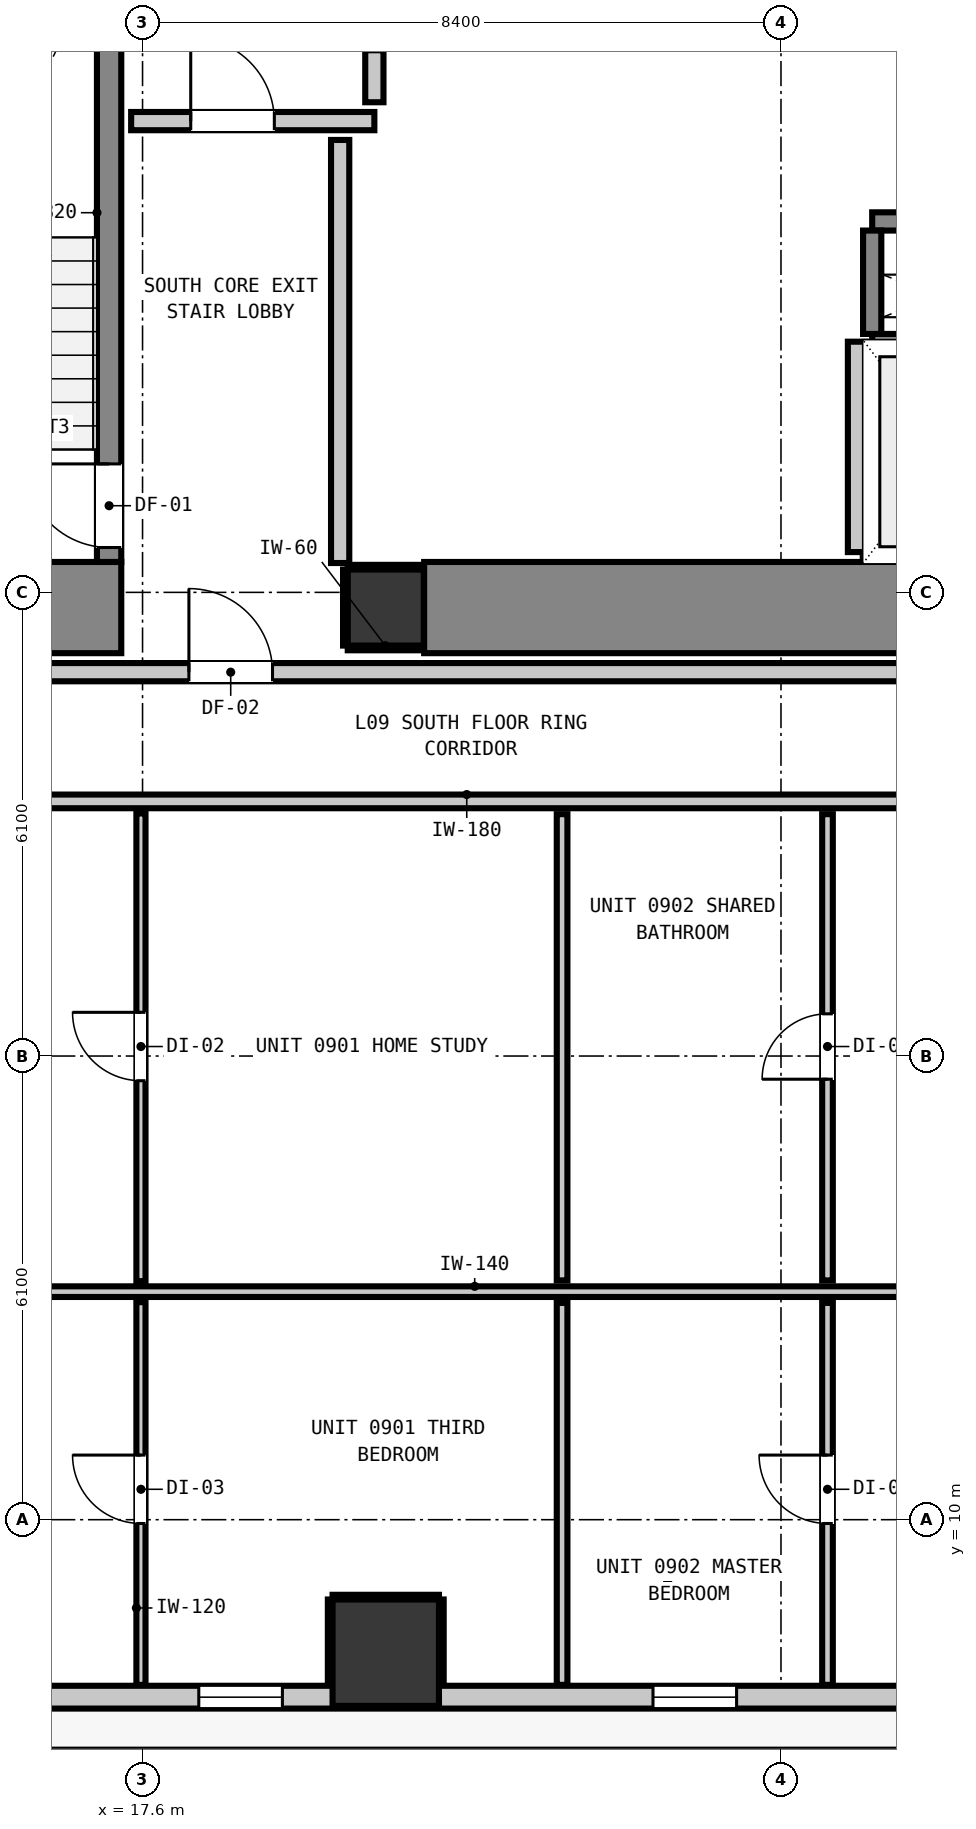
"""IFC4 building model, lengths in metres.
Left out: names, types, materials, properties, quantities, classifications, styles, units other than length and angle.
Written with IfcOpenShell. Run it as: python <this file> out.ifc"""

import sys

from ifc_helpers import new_model, si_unit, direction, frame, frame_2d, origin, origin_2d, place, context, subcontext, project, spatial, rectangle, extrude, element, fill, save


model = new_model("IFC4")
c1 = context("Model", 3, precision=1e-05, world=origin(), true_north=direction((0.0, 1.0)))
c2 = subcontext(c1, "Body", "Model", "MODEL_VIEW")
j1 = project(units=[si_unit("LENGTHUNIT", "METRE"), si_unit("PLANEANGLEUNIT", "RADIAN")], contexts=[c1])
p1 = place(None, origin())
s1 = spatial("IfcSite", under=j1, at=p1, CompositionType="ELEMENT")
p2 = place(p1, origin())
s2 = spatial("IfcBuilding", under=s1, at=p2, CompositionType="ELEMENT")
p3 = place(p2, frame((0.0, 0.0, 35.28)))
s3 = spatial("IfcBuildingStorey", under=s2, at=p3, CompositionType="ELEMENT", Elevation=35.28)
p4 = place(p3, frame((20.8, 22.0, 0.0), z_axis=(0.0, 0.0, 1.0), x_axis=(1.0, 0.0, 0.0)))
e1 = element("IfcColumn", 1, at=p4, inside=s3, PredefinedType="COLUMN", context=c2, shape_type="SweptSolid", body=[
    extrude(rectangle(XDim=1.0, YDim=1.0, at=origin_2d()), origin(), (0.0, 0.0, 1.0), 3.32),
])
p5 = place(p3, frame((13.24, 22.0, 0.0), z_axis=(0.0, 0.0, 1.0), x_axis=(1.0, 0.0, 0.0)))
e2 = element("IfcWall", 2, at=p5, inside=s3, PredefinedType="SHEAR", context=c2, shape_type="SweptSolid", body=[
    extrude(rectangle(XDim=4.08, YDim=1.2, at=frame_2d((2.04, 0.0))), origin(), (0.0, 0.0, 1.0), 3.32),
])
p6 = place(p3, frame((21.305, 22.0, 0.0), z_axis=(0.0, 0.0, 1.0), x_axis=(1.0, 0.0, 0.0)))
e3 = element("IfcWall", 3, at=p6, inside=s3, PredefinedType="SHEAR", context=c2, shape_type="SweptSolid", body=[
    extrude(rectangle(XDim=7.39, YDim=1.2, at=frame_2d((3.695, 0.0))), origin(), (0.0, 0.0, 1.0), 3.32),
])
p7 = place(p3, frame((17.16, 22.6, 0.0), z_axis=(0.0, 0.0, 1.0), x_axis=(0.0, 1.0, 0.0)))
e4 = element("IfcWall", 4, at=p7, inside=s3, PredefinedType="SHEAR", context=c2, shape_type="SweptSolid", body=[
    extrude(rectangle(XDim=7.8, YDim=0.32, at=frame_2d((3.9, 0.0))), origin(), (0.0, 0.0, 1.0), 3.32),
])
p8 = place(p7, frame((0.19, 0.0, 0.0)))
e5 = element("IfcOpeningElement", 5, at=p8, cuts=e4, PredefinedType="OPENING", context=c2, shape_type="SweptSolid", body=[
    extrude(rectangle(XDim=1.1, YDim=2.15, at=frame_2d((0.55, 1.075))), frame((0.0, 0.17, 0.0), z_axis=(0.0, -1.0, 0.0), x_axis=(1.0, 0.0, 0.0)), (0.0, 0.0, 1.0), 0.34),
])
for number, where, z_axis, x_axis in (
    (6, (27.2, 25.48, 0.0), (0.0, 0.0, 1.0), (1.0, 0.0, 0.0)),
    (7, (27.2, 27.08, 0.0), (0.0, 0.0, 1.0), (1.0, 0.0, 0.0)),
):
    element("IfcWall", number, at=place(p3, frame(where, z_axis=z_axis, x_axis=x_axis)), inside=s3, PredefinedType="SHEAR", context=c2, shape_type="SweptSolid", body=[
        extrude(rectangle(XDim=1.7, YDim=0.24, at=frame_2d((0.85, 0.0))), origin(), (0.0, 0.0, 1.0), 3.32),
    ])
p9 = place(p3, frame((27.2, 25.6, 0.0), z_axis=(0.0, 0.0, 1.0), x_axis=(0.0, 1.0, 0.0)))
e8 = element("IfcWall", 8, at=p9, inside=s3, PredefinedType="SHEAR", context=c2, shape_type="SweptSolid", body=[
    extrude(rectangle(XDim=1.36, YDim=0.24, at=frame_2d((0.68, 0.0))), origin(), (0.0, 0.0, 1.0), 3.32),
])
p10 = place(p3, frame((20.8, 8.25, 0.0), z_axis=(0.0, 0.0, 1.0), x_axis=(1.0, 0.0, 0.0)))
e9 = element("IfcColumn", 9, at=p10, inside=s3, PredefinedType="COLUMN", context=c2, shape_type="SweptSolid", body=[
    extrude(rectangle(XDim=1.4, YDim=1.4, at=origin_2d()), origin(), (0.0, 0.0, 1.0), 3.32),
])
p11 = place(p3, frame((41.635, 7.665, 0.0), z_axis=(0.0, 0.0, 1.0), x_axis=(-1.0, 0.0, 0.0)))
e10 = element("IfcWall", 10, at=p11, inside=s3, PredefinedType="STANDARD", context=c2, shape_type="SweptSolid", body=[
    extrude(rectangle(XDim=37.47, YDim=0.3, at=frame_2d((18.735, 0.0))), origin(), (0.0, 0.0, 1.0), 3.06),
])
p12 = place(p11, frame((0.901, 0.0, 0.0)))
e11 = element("IfcOpeningElement", 11, at=p12, cuts=e10, PredefinedType="OPENING", context=c2, shape_type="SweptSolid", body=[
    extrude(rectangle(XDim=1.0, YDim=2.15, at=frame_2d((0.5, 1.075))), frame((0.0, 0.16, 0.0), z_axis=(0.0, -1.0, 0.0), x_axis=(1.0, 0.0, 0.0)), (0.0, 0.0, 1.0), 0.32),
])
p13 = place(p11, frame((32.595, 0.0, 0.85)))
e12 = element("IfcOpeningElement", 12, at=p13, cuts=e10, PredefinedType="OPENING", context=c2, shape_type="SweptSolid", body=[
    extrude(rectangle(XDim=1.1, YDim=2.05, at=frame_2d((0.55, 1.025))), frame((0.0, 0.16, 0.0), z_axis=(0.0, -1.0, 0.0), x_axis=(1.0, 0.0, 0.0)), (0.0, 0.0, 1.0), 0.32),
])
p14 = place(p11, frame((36.621, 0.0, 0.85)))
e13 = element("IfcOpeningElement", 13, at=p14, cuts=e10, PredefinedType="OPENING", context=c2, shape_type="SweptSolid", body=[
    extrude(rectangle(XDim=0.58, YDim=1.5, at=frame_2d((0.29, 0.75))), frame((0.0, 0.16, 0.0), z_axis=(0.0, -1.0, 0.0), x_axis=(1.0, 0.0, 0.0)), (0.0, 0.0, 1.0), 0.32),
])
p15 = place(p11, frame((25.295, 0.0, 0.85)))
e14 = element("IfcOpeningElement", 14, at=p15, cuts=e10, PredefinedType="OPENING", context=c2, shape_type="SweptSolid", body=[
    extrude(rectangle(XDim=1.1, YDim=2.05, at=frame_2d((0.55, 1.025))), frame((0.0, 0.16, 0.0), z_axis=(0.0, -1.0, 0.0), x_axis=(1.0, 0.0, 0.0)), (0.0, 0.0, 1.0), 0.32),
])
p16 = place(p11, frame((22.195, 0.0, 0.85)))
e15 = element("IfcOpeningElement", 15, at=p16, cuts=e10, PredefinedType="OPENING", context=c2, shape_type="SweptSolid", body=[
    extrude(rectangle(XDim=1.1, YDim=2.05, at=frame_2d((0.55, 1.025))), frame((0.0, 0.16, 0.0), z_axis=(0.0, -1.0, 0.0), x_axis=(1.0, 0.0, 0.0)), (0.0, 0.0, 1.0), 0.32),
])
p17 = place(p11, frame((8.235, 0.0, 0.85)))
e16 = element("IfcOpeningElement", 16, at=p17, cuts=e10, PredefinedType="OPENING", context=c2, shape_type="SweptSolid", body=[
    extrude(rectangle(XDim=1.1, YDim=2.05, at=frame_2d((0.55, 1.025))), frame((0.0, 0.16, 0.0), z_axis=(0.0, -1.0, 0.0), x_axis=(1.0, 0.0, 0.0)), (0.0, 0.0, 1.0), 0.32),
])
p18 = place(p11, frame((16.219, 0.0, 0.85)))
e17 = element("IfcOpeningElement", 17, at=p18, cuts=e10, PredefinedType="OPENING", context=c2, shape_type="SweptSolid", body=[
    extrude(rectangle(XDim=1.1, YDim=2.05, at=frame_2d((0.55, 1.025))), frame((0.0, 0.16, 0.0), z_axis=(0.0, -1.0, 0.0), x_axis=(1.0, 0.0, 0.0)), (0.0, 0.0, 1.0), 0.32),
])
p19 = place(p3, frame((27.0, 22.73, 0.0), z_axis=(0.0, 0.0, 1.0), x_axis=(0.0, 1.0, 0.0)))
e18 = element("IfcWall", 18, at=p19, inside=s3, PredefinedType="PARTITIONING", context=c2, shape_type="SweptSolid", body=[
    extrude(rectangle(XDim=2.768, YDim=0.24, at=frame_2d((1.384, 0.0))), origin(), (0.0, 0.0, 1.0), 3.06),
])
p20 = place(p3, frame((1.827, 21.15, 0.0), z_axis=(0.0, 0.0, 1.0), x_axis=(1.0, 0.0, 0.0)))
e19 = element("IfcWall", 19, at=p20, inside=s3, PredefinedType="PARTITIONING", context=c2, shape_type="SweptSolid", body=[
    extrude(rectangle(XDim=42.146, YDim=0.24, at=frame_2d((21.073, 0.0))), origin(), (0.0, 0.0, 1.0), 3.06),
])
p21 = place(p20, frame((16.383, 0.0, 0.0)))
e20 = element("IfcOpeningElement", 20, at=p21, cuts=e19, PredefinedType="OPENING", context=c2, shape_type="SweptSolid", body=[
    extrude(rectangle(XDim=1.1, YDim=2.15, at=frame_2d((0.55, 1.075))), frame((0.0, 0.13, 0.0), z_axis=(0.0, -1.0, 0.0), x_axis=(1.0, 0.0, 0.0)), (0.0, 0.0, 1.0), 0.26),
])
p22 = place(p20, frame((8.647, 0.0, 0.0)))
e21 = element("IfcOpeningElement", 21, at=p22, cuts=e19, PredefinedType="OPENING", context=c2, shape_type="SweptSolid", body=[
    extrude(rectangle(XDim=1.4, YDim=2.15, at=frame_2d((0.7, 1.075))), frame((0.0, 0.13, 0.0), z_axis=(0.0, -1.0, 0.0), x_axis=(1.0, 0.0, 0.0)), (0.0, 0.0, 1.0), 0.26),
])
p23 = place(p20, frame((38.574, 0.0, 0.0)))
e22 = element("IfcOpeningElement", 22, at=p23, cuts=e19, PredefinedType="OPENING", context=c2, shape_type="SweptSolid", body=[
    extrude(rectangle(XDim=0.9, YDim=2.1, at=frame_2d((0.45, 1.05))), frame((0.0, 0.13, 0.0), z_axis=(0.0, -1.0, 0.0), x_axis=(1.0, 0.0, 0.0)), (0.0, 0.0, 1.0), 0.26),
])
p24 = place(p3, frame((17.45, 28.4, 0.0), z_axis=(0.0, 0.0, 1.0), x_axis=(1.0, 0.0, 0.0)))
e23 = element("IfcWall", 23, at=p24, inside=s3, PredefinedType="PARTITIONING", context=c2, shape_type="SweptSolid", body=[
    extrude(rectangle(XDim=3.2, YDim=0.24, at=frame_2d((1.6, 0.0))), origin(), (0.0, 0.0, 1.0), 3.06),
])
p25 = place(p24, frame((0.784, 0.0, 0.0)))
e24 = element("IfcOpeningElement", 24, at=p25, cuts=e23, PredefinedType="OPENING", context=c2, shape_type="SweptSolid", body=[
    extrude(rectangle(XDim=1.1, YDim=2.15, at=frame_2d((0.55, 1.075))), frame((0.0, 0.13, 0.0), z_axis=(0.0, -1.0, 0.0), x_axis=(1.0, 0.0, 0.0)), (0.0, 0.0, 1.0), 0.26),
])
p26 = place(p3, frame((1.827, 19.45, 0.0), z_axis=(0.0, 0.0, 1.0), x_axis=(1.0, 0.0, 0.0)))
e25 = element("IfcWall", 25, at=p26, inside=s3, PredefinedType="PARTITIONING", context=c2, shape_type="SweptSolid", body=[
    extrude(rectangle(XDim=42.146, YDim=0.18, at=frame_2d((21.073, 0.0))), origin(), (0.0, 0.0, 1.0), 3.06),
])
p27 = place(p26, frame((8.602, 0.0, 0.0)))
e26 = element("IfcOpeningElement", 26, at=p27, cuts=e25, PredefinedType="OPENING", context=c2, shape_type="SweptSolid", body=[
    extrude(rectangle(XDim=1.0, YDim=2.15, at=frame_2d((0.5, 1.075))), frame((0.0, 0.1, 0.0), z_axis=(0.0, -1.0, 0.0), x_axis=(1.0, 0.0, 0.0)), (0.0, 0.0, 1.0), 0.2),
])
p28 = place(p26, frame((30.475, 0.0, 0.0)))
e27 = element("IfcOpeningElement", 27, at=p28, cuts=e25, PredefinedType="OPENING", context=c2, shape_type="SweptSolid", body=[
    extrude(rectangle(XDim=1.0, YDim=2.15, at=frame_2d((0.5, 1.075))), frame((0.0, 0.1, 0.0), z_axis=(0.0, -1.0, 0.0), x_axis=(1.0, 0.0, 0.0)), (0.0, 0.0, 1.0), 0.2),
])
p29 = place(p3, frame((11.688, 13.0, 0.0), z_axis=(0.0, 0.0, 1.0), x_axis=(1.0, 0.0, 0.0)))
e28 = element("IfcWall", 28, at=p29, inside=s3, PredefinedType="PARTITIONING", context=c2, shape_type="SweptSolid", body=[
    extrude(rectangle(XDim=32.285, YDim=0.14, at=frame_2d((16.143, 0.0))), origin(), (0.0, 0.0, 1.0), 3.06),
])
p30 = place(p29, frame((20.664, 0.0, 0.0)))
e29 = element("IfcOpeningElement", 29, at=p30, cuts=e28, PredefinedType="OPENING", context=c2, shape_type="SweptSolid", body=[
    extrude(rectangle(XDim=0.9, YDim=2.1, at=frame_2d((0.45, 1.05))), frame((0.0, 0.08, 0.0), z_axis=(0.0, -1.0, 0.0), x_axis=(1.0, 0.0, 0.0)), (0.0, 0.0, 1.0), 0.16),
])
p31 = place(p3, frame((20.2, 22.586, 0.0), z_axis=(0.0, 0.0, 1.0), x_axis=(0.0, 1.0, 0.0)))
e30 = element("IfcWall", 30, at=p31, inside=s3, PredefinedType="PARTITIONING", context=c2, shape_type="SweptSolid", body=[
    extrude(rectangle(XDim=5.566, YDim=0.24, at=frame_2d((2.783, 0.0))), origin(), (0.0, 0.0, 1.0), 3.06),
])
p32 = place(p3, frame((20.65, 28.648, 0.0), z_axis=(0.0, 0.0, 1.0), x_axis=(0.0, 1.0, 0.0)))
e31 = element("IfcWall", 31, at=p32, inside=s3, PredefinedType="PARTITIONING", context=c2, shape_type="SweptSolid", body=[
    extrude(rectangle(XDim=0.684, YDim=0.24, at=frame_2d((0.342, 0.0))), origin(), (0.0, 0.0, 1.0), 2.295),
])
p33 = place(p3, frame((23.12, 7.827, 0.0), z_axis=(0.0, 0.0, 1.0), x_axis=(0.0, 1.0, 0.0)))
e32 = element("IfcWall", 32, at=p33, inside=s3, PredefinedType="PARTITIONING", context=c2, shape_type="SweptSolid", body=[
    extrude(rectangle(XDim=5.025, YDim=0.14, at=frame_2d((2.513, 0.0))), origin(), (0.0, 0.0, 1.0), 3.06),
])
p34 = place(p3, frame((23.12, 13.148, 0.0), z_axis=(0.0, 0.0, 1.0), x_axis=(0.0, 1.0, 0.0)))
e33 = element("IfcWall", 33, at=p34, inside=s3, PredefinedType="PARTITIONING", context=c2, shape_type="SweptSolid", body=[
    extrude(rectangle(XDim=6.134, YDim=0.14, at=frame_2d((3.067, 0.0))), origin(), (0.0, 0.0, 1.0), 3.06),
])
p35 = place(p3, frame((26.612, 7.827, 0.0), z_axis=(0.0, 0.0, 1.0), x_axis=(0.0, 1.0, 0.0)))
e34 = element("IfcWall", 34, at=p35, inside=s3, PredefinedType="PARTITIONING", context=c2, shape_type="SweptSolid", body=[
    extrude(rectangle(XDim=5.025, YDim=0.14, at=frame_2d((2.513, 0.0))), origin(), (0.0, 0.0, 1.0), 3.06),
])
p36 = place(p35, frame((2.123, 0.0, 0.0)))
e35 = element("IfcOpeningElement", 35, at=p36, cuts=e34, PredefinedType="OPENING", context=c2, shape_type="SweptSolid", body=[
    extrude(rectangle(XDim=0.9, YDim=2.1, at=frame_2d((0.45, 1.05))), frame((0.0, 0.08, 0.0), z_axis=(0.0, -1.0, 0.0), x_axis=(1.0, 0.0, 0.0)), (0.0, 0.0, 1.0), 0.16),
])
p37 = place(p3, frame((26.612, 13.148, 0.0), z_axis=(0.0, 0.0, 1.0), x_axis=(0.0, 1.0, 0.0)))
e36 = element("IfcWall", 36, at=p37, inside=s3, PredefinedType="PARTITIONING", context=c2, shape_type="SweptSolid", body=[
    extrude(rectangle(XDim=6.134, YDim=0.14, at=frame_2d((3.067, 0.0))), origin(), (0.0, 0.0, 1.0), 3.06),
])
p38 = place(p37, frame((2.647, 0.0, 0.0)))
e37 = element("IfcOpeningElement", 37, at=p38, cuts=e36, PredefinedType="OPENING", context=c2, shape_type="SweptSolid", body=[
    extrude(rectangle(XDim=0.86, YDim=2.02, at=frame_2d((0.43, 1.01))), frame((0.0, 0.08, 0.0), z_axis=(0.0, -1.0, 0.0), x_axis=(1.0, 0.0, 0.0)), (0.0, 0.0, 1.0), 0.16),
])
p39 = place(p3, frame((17.579, 7.827, 0.0), z_axis=(0.0, 0.0, 1.0), x_axis=(0.0, 1.0, 0.0)))
e38 = element("IfcWall", 38, at=p39, inside=s3, PredefinedType="PARTITIONING", context=c2, shape_type="SweptSolid", body=[
    extrude(rectangle(XDim=5.035, YDim=0.12, at=frame_2d((2.518, 0.0))), origin(), (0.0, 0.0, 1.0), 3.06),
])
p40 = place(p39, frame((2.123, 0.0, 0.0)))
e39 = element("IfcOpeningElement", 39, at=p40, cuts=e38, PredefinedType="OPENING", context=c2, shape_type="SweptSolid", body=[
    extrude(rectangle(XDim=0.9, YDim=2.1, at=frame_2d((0.45, 1.05))), frame((0.0, 0.07, 0.0), z_axis=(0.0, -1.0, 0.0), x_axis=(1.0, 0.0, 0.0)), (0.0, 0.0, 1.0), 0.14),
])
p41 = place(p3, frame((17.579, 13.138, 0.0), z_axis=(0.0, 0.0, 1.0), x_axis=(0.0, 1.0, 0.0)))
e40 = element("IfcWall", 40, at=p41, inside=s3, PredefinedType="PARTITIONING", context=c2, shape_type="SweptSolid", body=[
    extrude(rectangle(XDim=6.154, YDim=0.12, at=frame_2d((3.077, 0.0))), origin(), (0.0, 0.0, 1.0), 3.06),
])
p42 = place(p41, frame((2.637, 0.0, 0.0)))
e41 = element("IfcOpeningElement", 41, at=p42, cuts=e40, PredefinedType="OPENING", context=c2, shape_type="SweptSolid", body=[
    extrude(rectangle(XDim=0.9, YDim=2.1, at=frame_2d((0.45, 1.05))), frame((0.0, 0.07, 0.0), z_axis=(0.0, -1.0, 0.0), x_axis=(1.0, 0.0, 0.0)), (0.0, 0.0, 1.0), 0.14),
])
for number, where, z_axis, x_axis in (
    (42, (20.3, 21.468, 0.0), (0.0, 0.0, 1.0), (1.0, 0.0, 0.0)),
    (43, (20.3, 22.532, 0.0), (0.0, 0.0, 1.0), (1.0, 0.0, 0.0)),
):
    element("IfcWall", number, at=place(p3, frame(where, z_axis=z_axis, x_axis=x_axis)), inside=s3, PredefinedType="PARTITIONING", context=c2, shape_type="SweptSolid", body=[
        extrude(rectangle(XDim=0.99, YDim=0.06, at=frame_2d((0.495, 0.0))), origin(), (0.0, 0.0, 1.0), 1.45),
    ])
p43 = place(p3, frame((20.268, 21.5, 0.0), z_axis=(0.0, 0.0, 1.0), x_axis=(0.0, 1.0, 0.0)))
e44 = element("IfcWall", 44, at=p43, inside=s3, PredefinedType="PARTITIONING", context=c2, shape_type="SweptSolid", body=[
    extrude(rectangle(XDim=1.0, YDim=0.06, at=frame_2d((0.5, 0.0))), origin(), (0.0, 0.0, 1.0), 1.45),
])
p44 = place(p3, frame((20.1, 8.982, 0.0), z_axis=(0.0, 0.0, 1.0), x_axis=(1.0, 0.0, 0.0)))
e45 = element("IfcWall", 45, at=p44, inside=s3, PredefinedType="PARTITIONING", context=c2, shape_type="SweptSolid", body=[
    extrude(rectangle(XDim=1.4, YDim=0.06, at=frame_2d((0.7, 0.0))), origin(), (0.0, 0.0, 1.0), 1.45),
])
for number, where, z_axis, x_axis in (
    (46, (20.068, 7.83, 0.0), (0.0, 0.0, 1.0), (0.0, 1.0, 0.0)),
    (47, (21.532, 7.83, 0.0), (0.0, 0.0, 1.0), (0.0, 1.0, 0.0)),
):
    element("IfcWall", number, at=place(p3, frame(where, z_axis=z_axis, x_axis=x_axis)), inside=s3, PredefinedType="PARTITIONING", context=c2, shape_type="SweptSolid", body=[
        extrude(rectangle(XDim=1.12, YDim=0.06, at=frame_2d((0.56, 0.0))), origin(), (0.0, 0.0, 1.0), 1.45),
    ])
p45 = place(p16, origin())
e48 = element("IfcWindow", 48, at=p45, inside=s3, PartitioningType="SINGLE_PANEL", PredefinedType="WINDOW", context=c2, shape_type="SweptSolid", body=[
    extrude(rectangle(XDim=1.1, YDim=2.05, at=frame_2d((0.55, 1.025))), frame((0.0, 0.03, 0.0), z_axis=(0.0, -1.0, 0.0), x_axis=(1.0, 0.0, 0.0)), (0.0, 0.0, 1.0), 0.06),
])
fill(e15, e48)
p46 = place(p18, origin())
e49 = element("IfcWindow", 49, at=p46, inside=s3, PartitioningType="SINGLE_PANEL", PredefinedType="WINDOW", context=c2, shape_type="SweptSolid", body=[
    extrude(rectangle(XDim=1.1, YDim=2.05, at=frame_2d((0.55, 1.025))), frame((0.0, 0.03, 0.0), z_axis=(0.0, -1.0, 0.0), x_axis=(1.0, 0.0, 0.0)), (0.0, 0.0, 1.0), 0.06),
])
fill(e17, e49)
p47 = place(p8, origin())
e50 = element("IfcDoor", 50, at=p47, inside=s3, OperationType="SINGLE_SWING_RIGHT", PredefinedType="DOOR", context=c2, shape_type="SweptSolid", body=[
    extrude(rectangle(XDim=1.1, YDim=2.15, at=frame_2d((0.55, 1.075))), frame((0.0, 0.025, 0.0), z_axis=(0.0, -1.0, 0.0), x_axis=(1.0, 0.0, 0.0)), (0.0, 0.0, 1.0), 0.05),
])
fill(e5, e50)
p48 = place(p25, origin())
e51 = element("IfcDoor", 51, at=p48, inside=s3, OperationType="SINGLE_SWING_LEFT", PredefinedType="DOOR", context=c2, shape_type="SweptSolid", body=[
    extrude(rectangle(XDim=1.1, YDim=2.15, at=frame_2d((0.55, 1.075))), frame((0.0, 0.025, 0.0), z_axis=(0.0, -1.0, 0.0), x_axis=(1.0, 0.0, 0.0)), (0.0, 0.0, 1.0), 0.05),
])
fill(e24, e51)
p49 = place(p21, origin())
e52 = element("IfcDoor", 52, at=p49, inside=s3, OperationType="SINGLE_SWING_LEFT", PredefinedType="DOOR", context=c2, shape_type="SweptSolid", body=[
    extrude(rectangle(XDim=1.1, YDim=2.15, at=frame_2d((0.55, 1.075))), frame((0.0, 0.025, 0.0), z_axis=(0.0, -1.0, 0.0), x_axis=(1.0, 0.0, 0.0)), (0.0, 0.0, 1.0), 0.05),
])
fill(e20, e52)
p50 = place(p42, origin())
e53 = element("IfcDoor", 53, at=p50, inside=s3, OperationType="SINGLE_SWING_RIGHT", PredefinedType="DOOR", context=c2, shape_type="SweptSolid", body=[
    extrude(rectangle(XDim=0.9, YDim=2.1, at=frame_2d((0.45, 1.05))), frame((0.0, 0.025, 0.0), z_axis=(0.0, -1.0, 0.0), x_axis=(1.0, 0.0, 0.0)), (0.0, 0.0, 1.0), 0.05),
])
fill(e41, e53)
p51 = place(p40, origin())
e54 = element("IfcDoor", 54, at=p51, inside=s3, OperationType="SINGLE_SWING_RIGHT", PredefinedType="DOOR", context=c2, shape_type="SweptSolid", body=[
    extrude(rectangle(XDim=0.9, YDim=2.1, at=frame_2d((0.45, 1.05))), frame((0.0, 0.025, 0.0), z_axis=(0.0, -1.0, 0.0), x_axis=(1.0, 0.0, 0.0)), (0.0, 0.0, 1.0), 0.05),
])
fill(e39, e54)
p52 = place(p38, origin())
e55 = element("IfcDoor", 55, at=p52, inside=s3, OperationType="SINGLE_SWING_LEFT", PredefinedType="DOOR", context=c2, shape_type="SweptSolid", body=[
    extrude(rectangle(XDim=0.86, YDim=2.02, at=frame_2d((0.43, 1.01))), frame((0.0, 0.025, 0.0), z_axis=(0.0, -1.0, 0.0), x_axis=(1.0, 0.0, 0.0)), (0.0, 0.0, 1.0), 0.05),
])
fill(e37, e55)
p53 = place(p36, origin())
e56 = element("IfcDoor", 56, at=p53, inside=s3, OperationType="SINGLE_SWING_RIGHT", PredefinedType="DOOR", context=c2, shape_type="SweptSolid", body=[
    extrude(rectangle(XDim=0.9, YDim=2.1, at=frame_2d((0.45, 1.05))), frame((0.0, 0.025, 0.0), z_axis=(0.0, -1.0, 0.0), x_axis=(1.0, 0.0, 0.0)), (0.0, 0.0, 1.0), 0.05),
])
fill(e35, e56)
save(model, sys.argv[1])
